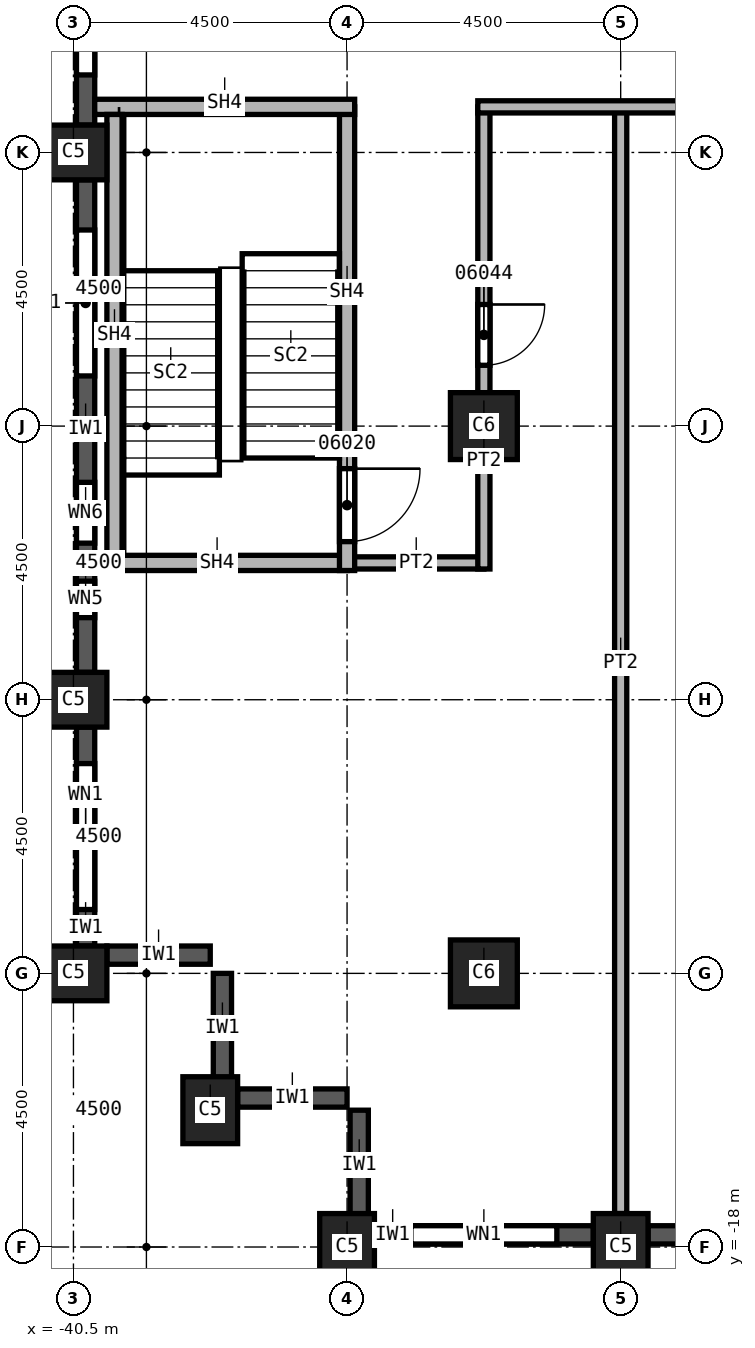
"""IFC4 building model, lengths in metres.
Left out: names, types, materials, properties, quantities, classifications, styles, units other than length and angle.
Written with IfcOpenShell. Run it as: python <this file> out.ifc"""

import sys

from ifc_helpers import new_model, si_unit, direction, frame, frame_2d, origin, origin_2d, place, context, subcontext, project, spatial, rectangle, extrude, element, fill, save


model = new_model("IFC4")
c1 = context("Model", 3, precision=1e-05, world=origin(), true_north=direction((0.0, 1.0)))
c2 = subcontext(c1, "Body", "Model", "MODEL_VIEW")
j1 = project(units=[si_unit("LENGTHUNIT", "METRE"), si_unit("PLANEANGLEUNIT", "RADIAN")], contexts=[c1])
p1 = place(None, origin())
s1 = spatial("IfcSite", under=j1, at=p1, CompositionType="ELEMENT")
p2 = place(p1, origin())
s2 = spatial("IfcBuilding", under=s1, at=p2, CompositionType="ELEMENT")
p3 = place(p2, frame((0.0, 0.0, 130.0)))
s3 = spatial("IfcBuildingStorey", under=s2, at=p3, CompositionType="ELEMENT", Elevation=130.0)
for number, where, z_axis, x_axis in (
    (1, (-40.5, 0.0, 0.0), (0.0, 0.0, 1.0), (0.0, 1.0, 0.0)),
    (2, (-40.5, -9.0, 0.0), (0.0, 0.0, 1.0), (0.0, 1.0, 0.0)),
    (3, (-40.5, -13.5, 0.0), (0.0, 0.0, 1.0), (0.0, 1.0, 0.0)),
    (4, (-38.25, -15.75, 0.0), (0.0, 0.0, 1.0), (1.0, 0.0, 0.0)),
    (5, (-31.5, -18.0, 0.0), (0.0, 0.0, 1.0), (1.0, 0.0, 0.0)),
    (6, (-36.0, -18.0, 0.0), (0.0, 0.0, 1.0), (1.0, 0.0, 0.0)),
):
    element("IfcColumn", number, at=place(p3, frame(where, z_axis=z_axis, x_axis=x_axis)), inside=s3, PredefinedType="COLUMN", context=c2, shape_type="SweptSolid", body=[
        extrude(rectangle(XDim=0.9, YDim=1.1, at=origin_2d()), origin(), (0.0, 0.0, 1.0), 3.7),
    ])
for number, where, z_axis, x_axis in (
    (7, (-33.75, -4.5, 0.0), (0.0, 0.0, 1.0), (1.0, 0.0, 0.0)),
    (8, (-33.75, -13.5, 0.0), (0.0, 0.0, 1.0), (1.0, 0.0, 0.0)),
):
    element("IfcColumn", number, at=place(p3, frame(where, z_axis=z_axis, x_axis=x_axis)), inside=s3, PredefinedType="COLUMN", context=c2, shape_type="SweptSolid", body=[
        extrude(rectangle(XDim=1.1, YDim=1.1, at=origin_2d()), origin(), (0.0, 0.0, 1.0), 3.7),
    ])
p4 = place(p3, frame((-39.95, -13.2, 0.0), z_axis=(0.0, 0.0, 1.0), x_axis=(1.0, 0.0, 0.0)))
e9 = element("IfcWall", 9, at=p4, inside=s3, PredefinedType="SOLIDWALL", context=c2, shape_type="SweptSolid", body=[
    extrude(rectangle(XDim=1.7, YDim=0.3, at=frame_2d((0.85, 0.0))), origin(), (0.0, 0.0, 1.0), 3.1),
])
for number, where, z_axis, x_axis in (
    (10, (-38.05, -15.3, 0.0), (0.0, 0.0, 1.0), (0.0, 1.0, 0.0)),
    (11, (-37.8, -15.55, 0.0), (0.0, 0.0, 1.0), (1.0, 0.0, 0.0)),
    (12, (-35.8, -17.55, 0.0), (0.0, 0.0, 1.0), (0.0, 1.0, 0.0)),
):
    element("IfcWall", number, at=place(p3, frame(where, z_axis=z_axis, x_axis=x_axis)), inside=s3, PredefinedType="SOLIDWALL", context=c2, shape_type="SweptSolid", body=[
        extrude(rectangle(XDim=1.8, YDim=0.3, at=frame_2d((0.9, 0.0))), origin(), (0.0, 0.0, 1.0), 3.1),
    ])
p5 = place(p3, frame((-40.3, 8.55, 0.0), z_axis=(0.0, 0.0, 1.0), x_axis=(0.0, -1.0, 0.0)))
e13 = element("IfcWall", 13, at=p5, inside=s3, PredefinedType="SOLIDWALL", context=c2, shape_type="SweptSolid", body=[
    extrude(rectangle(XDim=8.1, YDim=0.3, at=frame_2d((4.05, 0.0))), origin(), (0.0, 0.0, 1.0), 3.1),
])
p6 = place(p5, frame((0.825, 0.0, 0.8)))
e14 = element("IfcOpeningElement", 14, at=p6, cuts=e13, PredefinedType="OPENING", context=c2, shape_type="SweptSolid", body=[
    extrude(rectangle(XDim=2.4, YDim=1.95, at=frame_2d((1.2, 0.975))), frame((0.0, 0.15, 0.0), z_axis=(0.0, -1.0, 0.0), x_axis=(1.0, 0.0, 0.0)), (0.0, 0.0, 1.0), 0.3),
])
p7 = place(p5, frame((4.875, 0.0, 0.8)))
e15 = element("IfcOpeningElement", 15, at=p7, cuts=e13, PredefinedType="OPENING", context=c2, shape_type="SweptSolid", body=[
    extrude(rectangle(XDim=2.4, YDim=1.95, at=frame_2d((1.2, 0.975))), frame((0.0, 0.15, 0.0), z_axis=(0.0, -1.0, 0.0), x_axis=(1.0, 0.0, 0.0)), (0.0, 0.0, 1.0), 0.3),
])
p8 = place(p3, frame((-40.3, -0.45, 0.0), z_axis=(0.0, 0.0, 1.0), x_axis=(0.0, -1.0, 0.0)))
e16 = element("IfcWall", 16, at=p8, inside=s3, PredefinedType="SOLIDWALL", context=c2, shape_type="SweptSolid", body=[
    extrude(rectangle(XDim=8.1, YDim=0.3, at=frame_2d((4.05, 0.0))), origin(), (0.0, 0.0, 1.0), 3.1),
])
p9 = place(p8, frame((0.825, 0.0, 0.8)))
e17 = element("IfcOpeningElement", 17, at=p9, cuts=e16, PredefinedType="OPENING", context=c2, shape_type="SweptSolid", body=[
    extrude(rectangle(XDim=2.4, YDim=1.95, at=frame_2d((1.2, 0.975))), frame((0.0, 0.15, 0.0), z_axis=(0.0, -1.0, 0.0), x_axis=(1.0, 0.0, 0.0)), (0.0, 0.0, 1.0), 0.3),
])
p10 = place(p8, frame((4.975, 0.0, 0.8)))
e18 = element("IfcOpeningElement", 18, at=p10, cuts=e16, PredefinedType="OPENING", context=c2, shape_type="SweptSolid", body=[
    extrude(rectangle(XDim=1.0, YDim=1.95, at=frame_2d((0.5, 0.975))), frame((0.0, 0.15, 0.0), z_axis=(0.0, -1.0, 0.0), x_axis=(1.0, 0.0, 0.0)), (0.0, 0.0, 1.0), 0.3),
])
p11 = place(p8, frame((6.6, 0.0, 0.8)))
e19 = element("IfcOpeningElement", 19, at=p11, cuts=e16, PredefinedType="OPENING", context=c2, shape_type="SweptSolid", body=[
    extrude(rectangle(XDim=0.6, YDim=1.95, at=frame_2d((0.3, 0.975))), frame((0.0, 0.15, 0.0), z_axis=(0.0, -1.0, 0.0), x_axis=(1.0, 0.0, 0.0)), (0.0, 0.0, 1.0), 0.3),
])
p12 = place(p3, frame((-40.3, -9.45, 0.0), z_axis=(0.0, 0.0, 1.0), x_axis=(0.0, -1.0, 0.0)))
e20 = element("IfcWall", 20, at=p12, inside=s3, PredefinedType="SOLIDWALL", context=c2, shape_type="SweptSolid", body=[
    extrude(rectangle(XDim=3.6, YDim=0.3, at=frame_2d((1.8, 0.0))), origin(), (0.0, 0.0, 1.0), 3.1),
])
p13 = place(p12, frame((0.6, 0.0, 0.8)))
e21 = element("IfcOpeningElement", 21, at=p13, cuts=e20, PredefinedType="OPENING", context=c2, shape_type="SweptSolid", body=[
    extrude(rectangle(XDim=2.4, YDim=1.95, at=frame_2d((1.2, 0.975))), frame((0.0, 0.15, 0.0), z_axis=(0.0, -1.0, 0.0), x_axis=(1.0, 0.0, 0.0)), (0.0, 0.0, 1.0), 0.3),
])
p14 = place(p3, frame((-35.55, -17.8, 0.0), z_axis=(0.0, 0.0, 1.0), x_axis=(1.0, 0.0, 0.0)))
e22 = element("IfcWall", 22, at=p14, inside=s3, PredefinedType="SOLIDWALL", context=c2, shape_type="SweptSolid", body=[
    extrude(rectangle(XDim=3.6, YDim=0.3, at=frame_2d((1.8, 0.0))), origin(), (0.0, 0.0, 1.0), 3.1),
])
p15 = place(p14, frame((0.6, 0.0, 0.8)))
e23 = element("IfcOpeningElement", 23, at=p15, cuts=e22, PredefinedType="OPENING", context=c2, shape_type="SweptSolid", body=[
    extrude(rectangle(XDim=2.4, YDim=1.95, at=frame_2d((1.2, 0.975))), frame((0.0, 0.15, 0.0), z_axis=(0.0, -1.0, 0.0), x_axis=(1.0, 0.0, 0.0)), (0.0, 0.0, 1.0), 0.3),
])
p16 = place(p3, frame((-31.05, -17.8, 0.0), z_axis=(0.0, 0.0, 1.0), x_axis=(1.0, 0.0, 0.0)))
e24 = element("IfcWall", 24, at=p16, inside=s3, PredefinedType="SOLIDWALL", context=c2, shape_type="SweptSolid", body=[
    extrude(rectangle(XDim=3.6, YDim=0.3, at=frame_2d((1.8, 0.0))), origin(), (0.0, 0.0, 1.0), 3.1),
])
p17 = place(p16, frame((0.6, 0.0, 0.8)))
e25 = element("IfcOpeningElement", 25, at=p17, cuts=e24, PredefinedType="OPENING", context=c2, shape_type="SweptSolid", body=[
    extrude(rectangle(XDim=2.4, YDim=1.95, at=frame_2d((1.2, 0.975))), frame((0.0, 0.15, 0.0), z_axis=(0.0, -1.0, 0.0), x_axis=(1.0, 0.0, 0.0)), (0.0, 0.0, 1.0), 0.3),
])
p18 = place(p3, frame((-33.75, -6.75, 0.0), z_axis=(0.0, 0.0, 1.0), x_axis=(-1.0, 0.0, 0.0)))
e26 = element("IfcWall", 26, at=p18, inside=s3, PredefinedType="PARTITIONING", context=c2, shape_type="SweptSolid", body=[
    extrude(rectangle(XDim=2.25, YDim=0.2, at=frame_2d((1.125, 0.0))), origin(), (0.0, 0.0, 1.0), 3.7),
])
p19 = place(p3, frame((-33.75, 0.75, 0.0), z_axis=(0.0, 0.0, 1.0), x_axis=(0.0, -1.0, 0.0)))
e27 = element("IfcWall", 27, at=p19, inside=s3, PredefinedType="PARTITIONING", context=c2, shape_type="SweptSolid", body=[
    extrude(rectangle(XDim=7.6, YDim=0.2, at=frame_2d((3.8, 0.0))), origin(), (0.0, 0.0, 1.0), 3.7),
])
p20 = place(p19, frame((3.25, 0.0, 0.0)))
e28 = element("IfcOpeningElement", 28, at=p20, cuts=e27, PredefinedType="OPENING", context=c2, shape_type="SweptSolid", body=[
    extrude(rectangle(XDim=1.0, YDim=2.1, at=frame_2d((0.5, 1.05))), frame((0.0, 0.1, 0.0), z_axis=(0.0, -1.0, 0.0), x_axis=(1.0, 0.0, 0.0)), (0.0, 0.0, 1.0), 0.2),
])
p21 = place(p3, frame((-31.5, 0.75, 0.0), z_axis=(0.0, 0.0, 1.0), x_axis=(0.0, -1.0, 0.0)))
e29 = element("IfcWall", 29, at=p21, inside=s3, PredefinedType="PARTITIONING", context=c2, shape_type="SweptSolid", body=[
    extrude(rectangle(XDim=18.2, YDim=0.2, at=frame_2d((9.1, 0.0))), origin(), (0.0, 0.0, 1.0), 3.7),
])
p22 = place(p3, frame((-15.4, 0.75, 0.0), z_axis=(0.0, 0.0, 1.0), x_axis=(-1.0, 0.0, 0.0)))
e30 = element("IfcWall", 30, at=p22, inside=s3, PredefinedType="PARTITIONING", context=c2, shape_type="SweptSolid", body=[
    extrude(rectangle(XDim=18.45, YDim=0.2, at=frame_2d((9.225, 0.0))), origin(), (0.0, 0.0, 1.0), 3.7),
])
p23 = place(p22, frame((2.65, 0.0, 0.0)))
e31 = element("IfcOpeningElement", 31, at=p23, cuts=e30, PredefinedType="OPENING", context=c2, shape_type="SweptSolid", body=[
    extrude(rectangle(XDim=1.0, YDim=2.1, at=frame_2d((0.5, 1.05))), frame((0.0, 0.1, 0.0), z_axis=(0.0, -1.0, 0.0), x_axis=(1.0, 0.0, 0.0)), (0.0, 0.0, 1.0), 0.2),
])
p24 = place(p22, frame((12.5, 0.0, 0.0)))
e32 = element("IfcOpeningElement", 32, at=p24, cuts=e30, PredefinedType="OPENING", context=c2, shape_type="SweptSolid", body=[
    extrude(rectangle(XDim=1.0, YDim=2.1, at=frame_2d((0.5, 1.05))), frame((0.0, 0.1, 0.0), z_axis=(0.0, -1.0, 0.0), x_axis=(1.0, 0.0, 0.0)), (0.0, 0.0, 1.0), 0.2),
])
p25 = place(p3, frame((-36.0, -6.75, 0.0), z_axis=(0.0, 0.0, 1.0), x_axis=(-1.0, 0.0, 0.0)))
e33 = element("IfcWall", 33, at=p25, inside=s3, PredefinedType="SOLIDWALL", context=c2, shape_type="SweptSolid", body=[
    extrude(rectangle(XDim=4.15, YDim=0.25, at=frame_2d((2.075, 0.0))), origin(), (0.0, 0.0, 1.0), 3.7),
])
p26 = place(p3, frame((-36.0, 0.75, 0.0), z_axis=(0.0, 0.0, 1.0), x_axis=(0.0, -1.0, 0.0)))
e34 = element("IfcWall", 34, at=p26, inside=s3, PredefinedType="SOLIDWALL", context=c2, shape_type="SweptSolid", body=[
    extrude(rectangle(XDim=7.625, YDim=0.25, at=frame_2d((3.812, 0.0))), origin(), (0.0, 0.0, 1.0), 3.7),
])
p27 = place(p26, frame((5.95, 0.0, 0.0)))
e35 = element("IfcOpeningElement", 35, at=p27, cuts=e34, PredefinedType="OPENING", context=c2, shape_type="SweptSolid", body=[
    extrude(rectangle(XDim=1.2, YDim=2.1, at=frame_2d((0.6, 1.05))), frame((0.0, 0.125, 0.0), z_axis=(0.0, -1.0, 0.0), x_axis=(1.0, 0.0, 0.0)), (0.0, 0.0, 1.0), 0.25),
])
p28 = place(p3, frame((-35.875, 0.75, 0.0), z_axis=(0.0, 0.0, 1.0), x_axis=(-1.0, 0.0, 0.0)))
e36 = element("IfcWall", 36, at=p28, inside=s3, PredefinedType="SOLIDWALL", context=c2, shape_type="SweptSolid", body=[
    extrude(rectangle(XDim=4.275, YDim=0.25, at=frame_2d((2.137, 0.0))), origin(), (0.0, 0.0, 1.0), 3.7),
])
p29 = place(p3, frame((-39.825, -6.625, 0.0), z_axis=(0.0, 0.0, 1.0), x_axis=(0.0, 1.0, 0.0)))
e37 = element("IfcWall", 37, at=p29, inside=s3, PredefinedType="SOLIDWALL", context=c2, shape_type="SweptSolid", body=[
    extrude(rectangle(XDim=7.25, YDim=0.25, at=frame_2d((3.625, 0.0))), origin(), (0.0, 0.0, 1.0), 3.7),
])
p30 = place(p7, origin())
e38 = element("IfcWindow", 38, at=p30, inside=s3, PartitioningType="SINGLE_PANEL", PredefinedType="WINDOW", context=c2, shape_type="SweptSolid", body=[
    extrude(rectangle(XDim=2.4, YDim=1.95, at=frame_2d((1.2, 0.975))), frame((0.0, 0.03, 0.0), z_axis=(0.0, -1.0, 0.0), x_axis=(1.0, 0.0, 0.0)), (0.0, 0.0, 1.0), 0.06),
])
fill(e15, e38)
p31 = place(p9, origin())
e39 = element("IfcWindow", 39, at=p31, inside=s3, PartitioningType="SINGLE_PANEL", PredefinedType="WINDOW", context=c2, shape_type="SweptSolid", body=[
    extrude(rectangle(XDim=2.4, YDim=1.95, at=frame_2d((1.2, 0.975))), frame((0.0, 0.03, 0.0), z_axis=(0.0, -1.0, 0.0), x_axis=(1.0, 0.0, 0.0)), (0.0, 0.0, 1.0), 0.06),
])
fill(e17, e39)
p32 = place(p13, origin())
e40 = element("IfcWindow", 40, at=p32, inside=s3, PartitioningType="SINGLE_PANEL", PredefinedType="WINDOW", context=c2, shape_type="SweptSolid", body=[
    extrude(rectangle(XDim=2.4, YDim=1.95, at=frame_2d((1.2, 0.975))), frame((0.0, 0.03, 0.0), z_axis=(0.0, -1.0, 0.0), x_axis=(1.0, 0.0, 0.0)), (0.0, 0.0, 1.0), 0.06),
])
fill(e21, e40)
p33 = place(p15, origin())
e41 = element("IfcWindow", 41, at=p33, inside=s3, PartitioningType="SINGLE_PANEL", PredefinedType="WINDOW", context=c2, shape_type="SweptSolid", body=[
    extrude(rectangle(XDim=2.4, YDim=1.95, at=frame_2d((1.2, 0.975))), frame((0.0, 0.03, 0.0), z_axis=(0.0, -1.0, 0.0), x_axis=(1.0, 0.0, 0.0)), (0.0, 0.0, 1.0), 0.06),
])
fill(e23, e41)
p34 = place(p27, origin())
e42 = element("IfcDoor", 42, at=p34, inside=s3, OperationType="SINGLE_SWING_LEFT", PredefinedType="DOOR", context=c2, shape_type="SweptSolid", body=[
    extrude(rectangle(XDim=1.2, YDim=2.1, at=frame_2d((0.6, 1.05))), frame((0.0, 0.025, 0.0), z_axis=(0.0, -1.0, 0.0), x_axis=(1.0, 0.0, 0.0)), (0.0, 0.0, 1.0), 0.05),
])
fill(e35, e42)
p35 = place(p20, origin())
e43 = element("IfcDoor", 43, at=p35, inside=s3, OperationType="SINGLE_SWING_LEFT", PredefinedType="DOOR", context=c2, shape_type="SweptSolid", body=[
    extrude(rectangle(XDim=1.0, YDim=2.1, at=frame_2d((0.5, 1.05))), frame((0.0, 0.025, 0.0), z_axis=(0.0, -1.0, 0.0), x_axis=(1.0, 0.0, 0.0)), (0.0, 0.0, 1.0), 0.05),
])
fill(e28, e43)
p36 = place(p10, origin())
e44 = element("IfcWindow", 44, at=p36, inside=s3, PartitioningType="SINGLE_PANEL", PredefinedType="WINDOW", context=c2, shape_type="SweptSolid", body=[
    extrude(rectangle(XDim=1.0, YDim=1.95, at=frame_2d((0.5, 0.975))), frame((0.0, 0.03, 0.0), z_axis=(0.0, -1.0, 0.0), x_axis=(1.0, 0.0, 0.0)), (0.0, 0.0, 1.0), 0.06),
])
fill(e18, e44)
p37 = place(p11, origin())
e45 = element("IfcWindow", 45, at=p37, inside=s3, PartitioningType="SINGLE_PANEL", PredefinedType="WINDOW", context=c2, shape_type="SweptSolid", body=[
    extrude(rectangle(XDim=0.6, YDim=1.95, at=frame_2d((0.3, 0.975))), frame((0.0, 0.03, 0.0), z_axis=(0.0, -1.0, 0.0), x_axis=(1.0, 0.0, 0.0)), (0.0, 0.0, 1.0), 0.06),
])
fill(e19, e45)
save(model, sys.argv[1])
